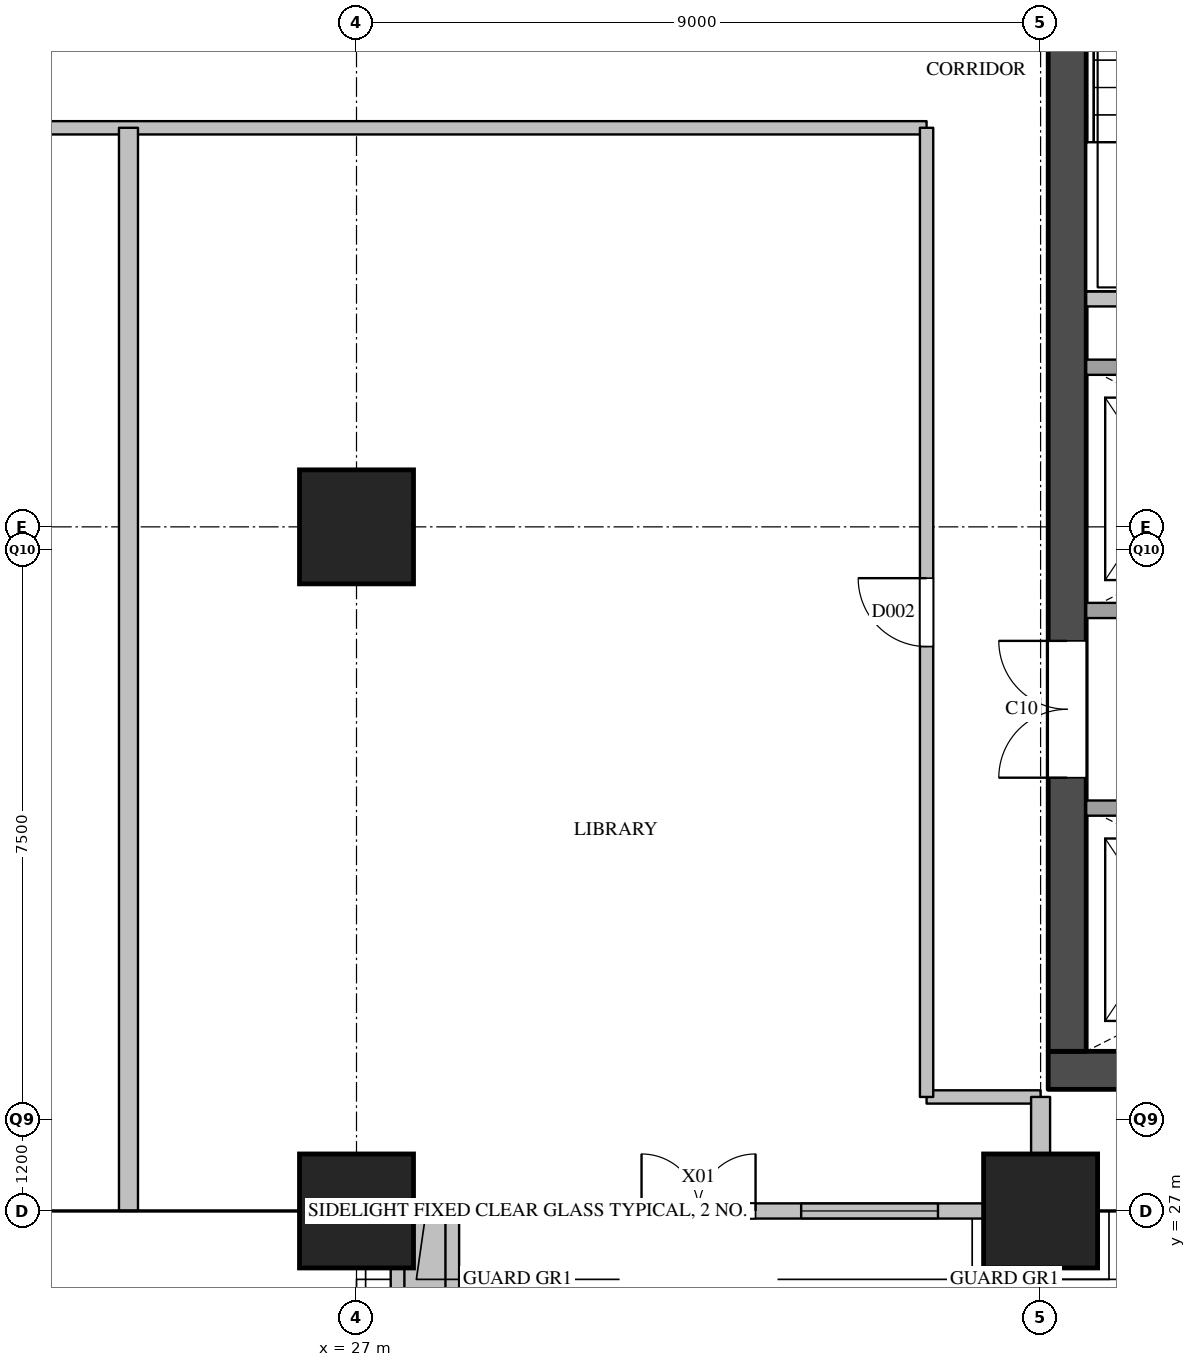
"""IFC4 building model, lengths in metres.
Left out: names, types, materials, properties, quantities, classifications, styles, units other than length and angle.
Written with IfcOpenShell. Run it as: python <this file> out.ifc"""

import sys

from ifc_helpers import new_model, si_unit, direction, frame, frame_2d, origin, origin_2d, place, context, subcontext, project, spatial, rectangle, extrude, element, fill, save


model = new_model("IFC4")
c1 = context("Model", 3, precision=1e-05, world=origin(), true_north=direction((0.0, 1.0)))
c2 = subcontext(c1, "Body", "Model", "MODEL_VIEW")
j1 = project(units=[si_unit("LENGTHUNIT", "METRE"), si_unit("PLANEANGLEUNIT", "RADIAN")], contexts=[c1])
p1 = place(None, origin())
s1 = spatial("IfcSite", under=j1, at=p1, CompositionType="ELEMENT")
p2 = place(p1, origin())
s2 = spatial("IfcBuilding", under=s1, at=p2, CompositionType="ELEMENT")
p3 = place(p2, frame((0.0, 0.0, 129.4)))
s3 = spatial("IfcBuildingStorey", under=s2, at=p3, CompositionType="ELEMENT", Elevation=129.4)
for number, where, z_axis, x_axis in (
    (1, (27.0, 27.0, 0.0), (0.0, 0.0, 1.0), (1.0, 0.0, 0.0)),
    (2, (27.0, 36.0, 0.0), (0.0, 0.0, 1.0), (1.0, 0.0, 0.0)),
    (3, (36.0, 27.0, 0.0), (0.0, 0.0, 1.0), (1.0, 0.0, 0.0)),
):
    element("IfcColumn", number, at=place(p3, frame(where, z_axis=z_axis, x_axis=x_axis)), inside=s3, PredefinedType="COLUMN", context=c2, shape_type="SweptSolid", body=[
        extrude(rectangle(XDim=1.5, YDim=1.5, at=origin_2d()), origin(), (0.0, 0.0, 1.0), 5.5),
    ])
p4 = place(p3, frame((27.75, 27.0, 0.0), z_axis=(0.0, 0.0, 1.0), x_axis=(1.0, 0.0, 0.0)))
e4 = element("IfcWall", 4, at=p4, inside=s3, PredefinedType="SOLIDWALL", context=c2, shape_type="SweptSolid", body=[
    extrude(rectangle(XDim=7.5, YDim=0.2, at=frame_2d((3.75, 0.0))), origin(), (0.0, 0.0, 1.0), 4.2),
])
p5 = place(p4, frame((3.0, 0.0, 0.0)))
e5 = element("IfcOpeningElement", 5, at=p5, cuts=e4, PredefinedType="OPENING", context=c2, shape_type="SweptSolid", body=[
    extrude(rectangle(XDim=1.5, YDim=2.1, at=frame_2d((0.75, 1.05))), frame((0.0, 0.11, 0.0), z_axis=(0.0, -1.0, 0.0), x_axis=(1.0, 0.0, 0.0)), (0.0, 0.0, 1.0), 0.22),
])
p6 = place(p4, frame((0.6, 0.0, 0.1)))
e6 = element("IfcOpeningElement", 6, at=p6, cuts=e4, PredefinedType="OPENING", context=c2, shape_type="SweptSolid", body=[
    extrude(rectangle(XDim=1.8, YDim=2.3, at=frame_2d((0.9, 1.15))), frame((0.0, 0.11, 0.0), z_axis=(0.0, -1.0, 0.0), x_axis=(1.0, 0.0, 0.0)), (0.0, 0.0, 1.0), 0.22),
])
p7 = place(p4, frame((5.1, 0.0, 0.1)))
e7 = element("IfcOpeningElement", 7, at=p7, cuts=e4, PredefinedType="OPENING", context=c2, shape_type="SweptSolid", body=[
    extrude(rectangle(XDim=1.8, YDim=2.3, at=frame_2d((0.9, 1.15))), frame((0.0, 0.11, 0.0), z_axis=(0.0, -1.0, 0.0), x_axis=(1.0, 0.0, 0.0)), (0.0, 0.0, 1.0), 0.22),
])
p8 = place(p3, frame((27.9, 4.588, 0.0), z_axis=(0.0, 0.0, 1.0), x_axis=(-1.0917627e-05, 0.99999999994, 0.0)))
e8 = element("IfcWall", 8, at=p8, inside=s3, PredefinedType="SOLIDWALL", context=c2, shape_type="SweptSolid", body=[
    extrude(rectangle(XDim=22.362, YDim=0.9, at=frame_2d((11.181, 0.0))), origin(), (0.0, 0.0, 1.0), 0.6),
])
p9 = place(p3, frame((27.9, 25.664, 0.6), z_axis=(0.0, 0.0, 1.0), x_axis=(0.0, 1.0, 0.0)))
e9 = element("IfcWall", 9, at=p9, inside=s3, PredefinedType="SOLIDWALL", context=c2, shape_type="SweptSolid", body=[
    extrude(rectangle(XDim=1.286, YDim=0.54, at=frame_2d((0.643, 0.0))), origin(), (0.0, 0.0, 1.0), 0.75),
])
p10 = place(p3, frame((36.1, 28.85, 0.0), z_axis=(0.0, 0.0, 1.0), x_axis=(1.0, 0.0, 0.0)))
e10 = element("IfcWall", 10, at=p10, inside=s3, PredefinedType="SHEAR", context=c2, shape_type="SweptSolid", body=[
    extrude(rectangle(XDim=12.2, YDim=0.5, at=frame_2d((6.1, 0.0))), origin(), (0.0, 0.0, 1.0), 5.2),
])
p11 = place(p10, frame((0.95, 0.0, 0.0)))
e11 = element("IfcOpeningElement", 11, at=p11, cuts=e10, PredefinedType="OPENING", context=c2, shape_type="SweptSolid", body=[
    extrude(rectangle(XDim=1.2, YDim=2.1, at=frame_2d((0.6, 1.05))), frame((0.0, 0.26, 0.0), z_axis=(0.0, -1.0, 0.0), x_axis=(1.0, 0.0, 0.0)), (0.0, 0.0, 1.0), 0.52),
])
p12 = place(p10, frame((3.05, 0.0, 0.0)))
e12 = element("IfcOpeningElement", 12, at=p12, cuts=e10, PredefinedType="OPENING", context=c2, shape_type="SweptSolid", body=[
    extrude(rectangle(XDim=1.2, YDim=2.1, at=frame_2d((0.6, 1.05))), frame((0.0, 0.26, 0.0), z_axis=(0.0, -1.0, 0.0), x_axis=(1.0, 0.0, 0.0)), (0.0, 0.0, 1.0), 0.52),
])
p13 = place(p10, frame((5.15, 0.0, 0.0)))
e13 = element("IfcOpeningElement", 13, at=p13, cuts=e10, PredefinedType="OPENING", context=c2, shape_type="SweptSolid", body=[
    extrude(rectangle(XDim=1.2, YDim=2.1, at=frame_2d((0.6, 1.05))), frame((0.0, 0.26, 0.0), z_axis=(0.0, -1.0, 0.0), x_axis=(1.0, 0.0, 0.0)), (0.0, 0.0, 1.0), 0.52),
])
p14 = place(p3, frame((36.35, 29.1, 0.0), z_axis=(0.0, 0.0, 1.0), x_axis=(0.0, 1.0, 0.0)))
e14 = element("IfcWall", 14, at=p14, inside=s3, PredefinedType="SHEAR", context=c2, shape_type="SweptSolid", body=[
    extrude(rectangle(XDim=20.3, YDim=0.5, at=frame_2d((10.15, 0.0))), origin(), (0.0, 0.0, 1.0), 5.2),
])
p15 = place(p14, frame((3.6, 0.0, 0.0)))
e15 = element("IfcOpeningElement", 15, at=p15, cuts=e14, PredefinedType="OPENING", context=c2, shape_type="SweptSolid", body=[
    extrude(rectangle(XDim=1.8, YDim=2.1, at=frame_2d((0.9, 1.05))), frame((0.0, 0.26, 0.0), z_axis=(0.0, -1.0, 0.0), x_axis=(1.0, 0.0, 0.0)), (0.0, 0.0, 1.0), 0.52),
])
p16 = place(p14, frame((16.4, 0.0, 0.0)))
e16 = element("IfcOpeningElement", 16, at=p16, cuts=e14, PredefinedType="OPENING", context=c2, shape_type="SweptSolid", body=[
    extrude(rectangle(XDim=1.0, YDim=2.1, at=frame_2d((0.5, 1.05))), frame((0.0, 0.26, 0.0), z_axis=(0.0, -1.0, 0.0), x_axis=(1.0, 0.0, 0.0)), (0.0, 0.0, 1.0), 0.52),
])
p17 = place(p3, frame((36.6, 32.3, 0.0), z_axis=(0.0, 0.0, 1.0), x_axis=(1.0, 0.0, 0.0)))
e17 = element("IfcWall", 17, at=p17, inside=s3, PredefinedType="SOLIDWALL", context=c2, shape_type="SweptSolid", body=[
    extrude(rectangle(XDim=11.2, YDim=0.2, at=frame_2d((5.6, 0.0))), origin(), (0.0, 0.0, 1.0), 5.2),
])
p18 = place(p17, frame((7.225, 0.0, 0.0)))
e18 = element("IfcOpeningElement", 18, at=p18, cuts=e17, PredefinedType="OPENING", context=c2, shape_type="SweptSolid", body=[
    extrude(rectangle(XDim=1.2, YDim=2.1, at=frame_2d((0.6, 1.05))), frame((0.0, 0.11, 0.0), z_axis=(0.0, -1.0, 0.0), x_axis=(1.0, 0.0, 0.0)), (0.0, 0.0, 1.0), 0.22),
])
p19 = place(p17, frame((9.475, 0.0, 0.0)))
e19 = element("IfcOpeningElement", 19, at=p19, cuts=e17, PredefinedType="OPENING", context=c2, shape_type="SweptSolid", body=[
    extrude(rectangle(XDim=1.2, YDim=2.1, at=frame_2d((0.6, 1.05))), frame((0.0, 0.11, 0.0), z_axis=(0.0, -1.0, 0.0), x_axis=(1.0, 0.0, 0.0)), (0.0, 0.0, 1.0), 0.22),
])
p20 = place(p3, frame((36.6, 34.9, 0.0), z_axis=(0.0, 0.0, 1.0), x_axis=(1.0, 0.0, 0.0)))
e20 = element("IfcWall", 20, at=p20, inside=s3, PredefinedType="SOLIDWALL", context=c2, shape_type="SweptSolid", body=[
    extrude(rectangle(XDim=6.3, YDim=0.2, at=frame_2d((3.15, 0.0))), origin(), (0.0, 0.0, 1.0), 5.2),
])
p21 = place(p3, frame((36.6, 38.1, 0.0), z_axis=(0.0, 0.0, 1.0), x_axis=(1.0, 0.0, 0.0)))
e21 = element("IfcWall", 21, at=p21, inside=s3, PredefinedType="SOLIDWALL", context=c2, shape_type="SweptSolid", body=[
    extrude(rectangle(XDim=6.7, YDim=0.2, at=frame_2d((3.35, 0.0))), origin(), (0.0, 0.0, 1.0), 5.2),
])
p22 = place(p21, frame((0.45, 0.0, 0.0)))
e22 = element("IfcOpeningElement", 22, at=p22, cuts=e21, PredefinedType="OPENING", context=c2, shape_type="SweptSolid", body=[
    extrude(rectangle(XDim=1.2, YDim=2.1, at=frame_2d((0.6, 1.05))), frame((0.0, 0.11, 0.0), z_axis=(0.0, -1.0, 0.0), x_axis=(1.0, 0.0, 0.0)), (0.0, 0.0, 1.0), 0.22),
])
p23 = place(p21, frame((2.55, 0.0, 0.0)))
e23 = element("IfcOpeningElement", 23, at=p23, cuts=e21, PredefinedType="OPENING", context=c2, shape_type="SweptSolid", body=[
    extrude(rectangle(XDim=1.2, YDim=2.1, at=frame_2d((0.6, 1.05))), frame((0.0, 0.11, 0.0), z_axis=(0.0, -1.0, 0.0), x_axis=(1.0, 0.0, 0.0)), (0.0, 0.0, 1.0), 0.22),
])
p24 = place(p21, frame((4.65, 0.0, 0.0)))
e24 = element("IfcOpeningElement", 24, at=p24, cuts=e21, PredefinedType="OPENING", context=c2, shape_type="SweptSolid", body=[
    extrude(rectangle(XDim=1.2, YDim=2.1, at=frame_2d((0.6, 1.05))), frame((0.0, 0.11, 0.0), z_axis=(0.0, -1.0, 0.0), x_axis=(1.0, 0.0, 0.0)), (0.0, 0.0, 1.0), 0.22),
])
p25 = place(p3, frame((36.6, 39.0, 0.0), z_axis=(0.0, 0.0, 1.0), x_axis=(1.0, 0.0, 0.0)))
e25 = element("IfcWall", 25, at=p25, inside=s3, PredefinedType="SOLIDWALL", context=c2, shape_type="SweptSolid", body=[
    extrude(rectangle(XDim=3.25, YDim=0.2, at=frame_2d((1.625, 0.0))), origin(), (0.0, 0.0, 1.0), 5.2),
])
p26 = place(p3, frame((34.5, 28.5, 0.0), z_axis=(0.0, 0.0, 1.0), x_axis=(1.0, 0.0, 0.0)))
e26 = element("IfcWall", 26, at=p26, inside=s3, PredefinedType="PARTITIONING", context=c2, shape_type="SweptSolid", body=[
    extrude(rectangle(XDim=1.5, YDim=0.175, at=frame_2d((0.75, 0.0))), origin(), (0.0, 0.0, 1.0), 5.2),
])
p27 = place(p3, frame((19.5, 41.25, 0.0), z_axis=(0.0, 0.0, 1.0), x_axis=(1.0, 0.0, 0.0)))
e27 = element("IfcWall", 27, at=p27, inside=s3, PredefinedType="PARTITIONING", context=c2, shape_type="SweptSolid", body=[
    extrude(rectangle(XDim=15.0, YDim=0.175, at=frame_2d((7.5, 0.0))), origin(), (0.0, 0.0, 1.0), 4.2),
])
p28 = place(p3, frame((34.5, 28.5, 0.0), z_axis=(0.0, 0.0, 1.0), x_axis=(0.0, 1.0, 0.0)))
e28 = element("IfcWall", 28, at=p28, inside=s3, PredefinedType="PARTITIONING", context=c2, shape_type="SweptSolid", body=[
    extrude(rectangle(XDim=12.75, YDim=0.175, at=frame_2d((6.375, 0.0))), origin(), (0.0, 0.0, 1.0), 5.2),
])
p29 = place(p28, frame((5.925, 0.0, 0.0)))
e29 = element("IfcOpeningElement", 29, at=p29, cuts=e28, PredefinedType="OPENING", context=c2, shape_type="SweptSolid", body=[
    extrude(rectangle(XDim=0.9, YDim=2.1, at=frame_2d((0.45, 1.05))), frame((0.0, 0.097, 0.0), z_axis=(0.0, -1.0, 0.0), x_axis=(1.0, 0.0, 0.0)), (0.0, 0.0, 1.0), 0.195),
])
p30 = place(p3, frame((24.0, 27.0, 0.0), z_axis=(0.0, 0.0, 1.0), x_axis=(0.0, 1.0, 0.0)))
e30 = element("IfcWall", 30, at=p30, inside=s3, PredefinedType="PARTITIONING", context=c2, shape_type="SweptSolid", body=[
    extrude(rectangle(XDim=14.25, YDim=0.25, at=frame_2d((7.125, 0.0))), origin(), (0.0, 0.0, 1.0), 4.2),
])
p31 = place(p3, frame((36.0, 27.0, 0.0), z_axis=(0.0, 0.0, 1.0), x_axis=(0.0, 1.0, 0.0)))
e31 = element("IfcWall", 31, at=p31, inside=s3, PredefinedType="PARTITIONING", context=c2, shape_type="SweptSolid", body=[
    extrude(rectangle(XDim=1.5, YDim=0.25, at=frame_2d((0.75, 0.0))), origin(), (0.0, 0.0, 1.0), 5.2),
])
p32 = place(p5, origin())
e32 = element("IfcDoor", 32, at=p32, inside=s3, OperationType="DOUBLE_DOOR_SINGLE_SWING", PredefinedType="DOOR", context=c2, shape_type="SweptSolid", body=[
    extrude(rectangle(XDim=1.5, YDim=2.1, at=frame_2d((0.75, 1.05))), frame((0.0, 0.025, 0.0), z_axis=(0.0, -1.0, 0.0), x_axis=(1.0, 0.0, 0.0)), (0.0, 0.0, 1.0), 0.05),
])
fill(e5, e32)
p33 = place(p6, origin())
e33 = element("IfcWindow", 33, at=p33, inside=s3, PartitioningType="SINGLE_PANEL", PredefinedType="WINDOW", context=c2, shape_type="SweptSolid", body=[
    extrude(rectangle(XDim=1.8, YDim=2.3, at=frame_2d((0.9, 1.15))), frame((0.0, 0.03, 0.0), z_axis=(0.0, -1.0, 0.0), x_axis=(1.0, 0.0, 0.0)), (0.0, 0.0, 1.0), 0.06),
])
fill(e6, e33)
p34 = place(p7, origin())
e34 = element("IfcWindow", 34, at=p34, inside=s3, PartitioningType="SINGLE_PANEL", PredefinedType="WINDOW", context=c2, shape_type="SweptSolid", body=[
    extrude(rectangle(XDim=1.8, YDim=2.3, at=frame_2d((0.9, 1.15))), frame((0.0, 0.03, 0.0), z_axis=(0.0, -1.0, 0.0), x_axis=(1.0, 0.0, 0.0)), (0.0, 0.0, 1.0), 0.06),
])
fill(e7, e34)
p35 = place(p15, origin())
e35 = element("IfcDoor", 35, at=p35, inside=s3, OperationType="DOUBLE_DOOR_SINGLE_SWING", PredefinedType="DOOR", context=c2, shape_type="SweptSolid", body=[
    extrude(rectangle(XDim=1.8, YDim=2.1, at=frame_2d((0.9, 1.05))), frame((0.0, 0.025, 0.0), z_axis=(0.0, -1.0, 0.0), x_axis=(1.0, 0.0, 0.0)), (0.0, 0.0, 1.0), 0.05),
])
fill(e15, e35)
p36 = place(p29, origin())
e36 = element("IfcDoor", 36, at=p36, inside=s3, OperationType="SINGLE_SWING_RIGHT", PredefinedType="DOOR", context=c2, shape_type="SweptSolid", body=[
    extrude(rectangle(XDim=0.9, YDim=2.1, at=frame_2d((0.45, 1.05))), frame((0.0, 0.025, 0.0), z_axis=(0.0, -1.0, 0.0), x_axis=(1.0, 0.0, 0.0)), (0.0, 0.0, 1.0), 0.05),
])
fill(e29, e36)
save(model, sys.argv[1])
